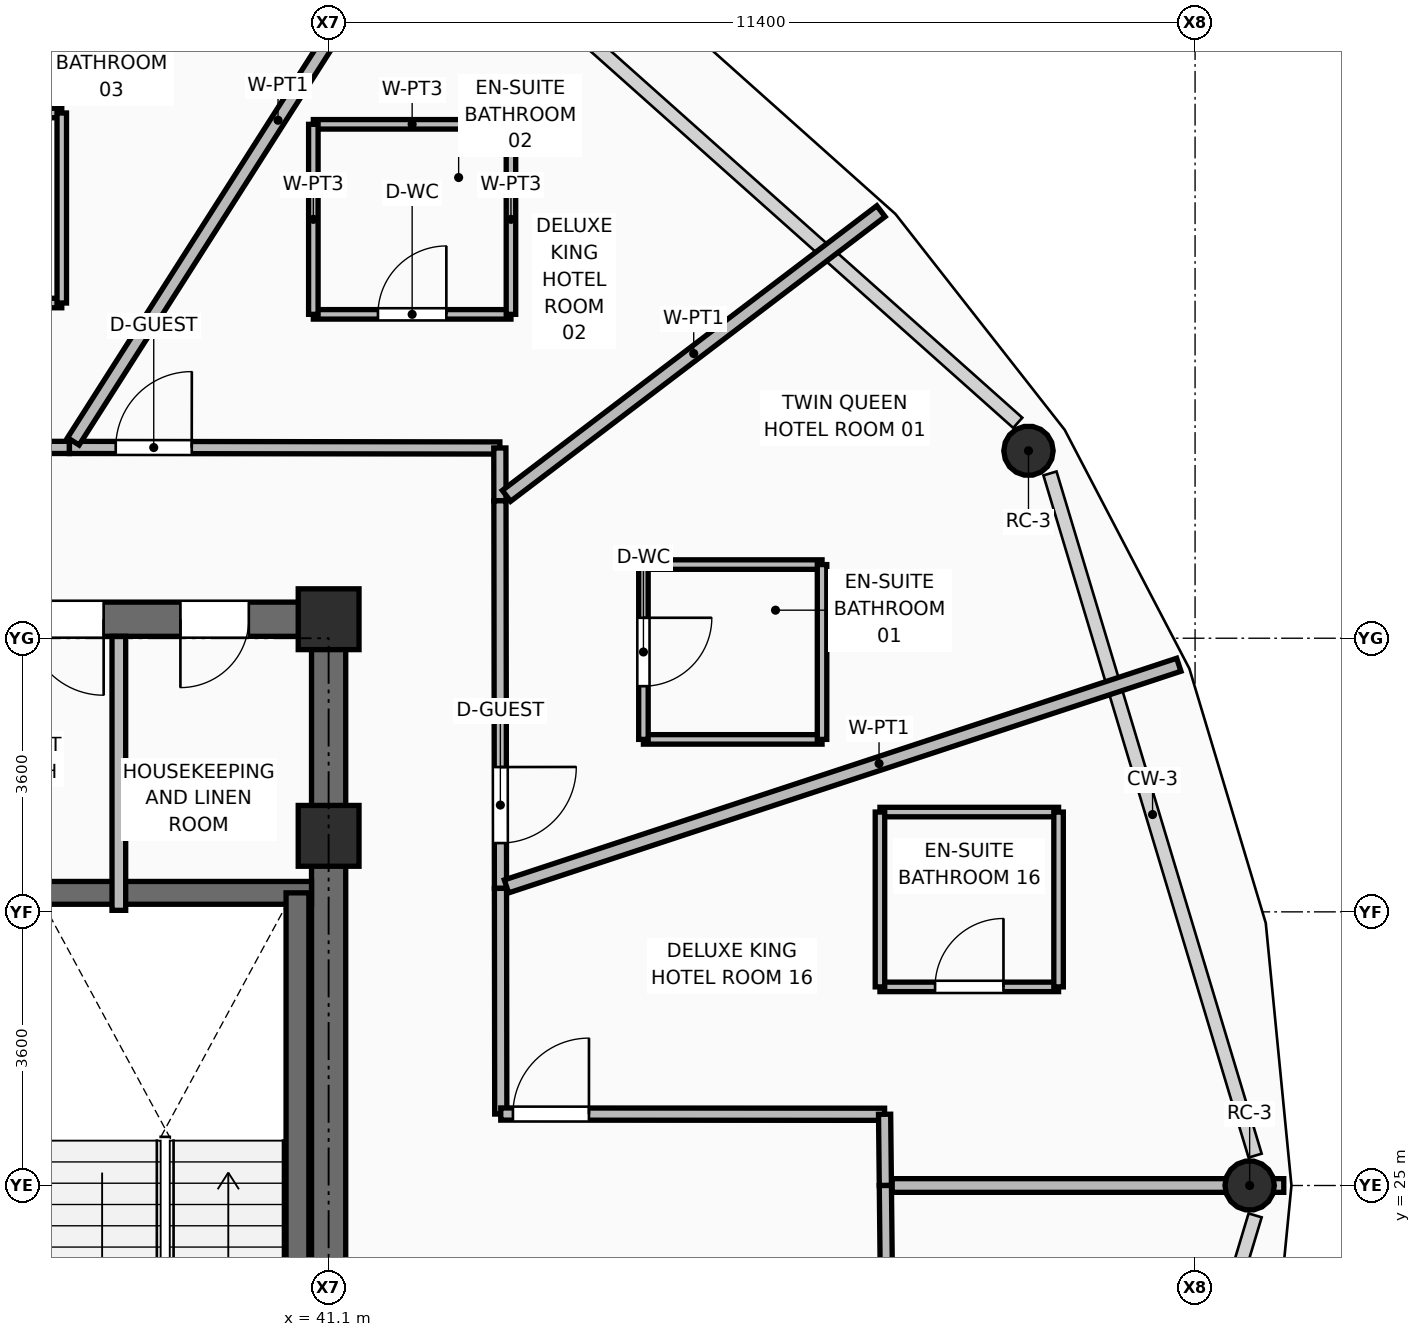
"""IFC4 building model, lengths in metres.
Left out: names, types, materials, properties, quantities, classifications, styles, units other than length and angle.
Written with IfcOpenShell. Run it as: python <this file> out.ifc"""

import sys

from ifc_helpers import new_model, si_unit, direction, frame, frame_2d, origin, origin_2d, place, context, subcontext, project, spatial, rectangle, hollow_circle, extrude, element, fill, save


model = new_model("IFC4")
c1 = context("Model", 3, precision=1e-05, world=origin(), true_north=direction((0.0, 1.0)))
c2 = subcontext(c1, "Body", "Model", "MODEL_VIEW")
j1 = project(units=[si_unit("LENGTHUNIT", "METRE"), si_unit("PLANEANGLEUNIT", "RADIAN")], contexts=[c1])
p1 = place(None, origin())
s1 = spatial("IfcSite", under=j1, at=p1, CompositionType="ELEMENT")
p2 = place(p1, origin())
s2 = spatial("IfcBuilding", under=s1, at=p2, CompositionType="ELEMENT")
p3 = place(p2, frame((0.0, 0.0, 249.9)))
s3 = spatial("IfcBuildingStorey", under=s2, at=p3, CompositionType="ELEMENT", Elevation=249.9)
for number, where, z_axis, x_axis in (
    (1, (41.1, 29.6, 0.0), (0.0, 0.0, 1.0), (1.0, 0.0, 0.0)),
    (2, (41.1, 32.45, 0.0), (0.0, 0.0, 1.0), (1.0, 0.0, 0.0)),
):
    element("IfcColumn", number, at=place(p3, frame(where, z_axis=z_axis, x_axis=x_axis)), inside=s3, PredefinedType="COLUMN", context=c2, shape_type="SweptSolid", body=[
        extrude(rectangle(XDim=0.8, YDim=0.8, at=origin_2d()), origin(), (0.0, 0.0, 1.0), 3.75),
    ])
p4 = place(p3, frame((53.218, 25.0, 0.0), z_axis=(-0.104543948341, 0.0, 0.9945202677), x_axis=(0.0, -1.0, 0.0)))
e3 = element("IfcColumn", 3, at=p4, inside=s3, PredefinedType="COLUMN", context=c2, shape_type="SweptSolid", body=[
    extrude(hollow_circle(Radius=0.325, WallThickness=0.03, at=origin_2d()), origin(), (0.0, 0.0, 1.0), 3.519),
])
p5 = place(p3, frame((50.308, 34.666, 0.0), z_axis=(-0.09041848627, -0.04663179031, 0.994811526608), x_axis=(0.458364904761, -0.888764093606, 0.0)))
e4 = element("IfcColumn", 4, at=p5, inside=s3, PredefinedType="COLUMN", context=c2, shape_type="SweptSolid", body=[
    extrude(hollow_circle(Radius=0.325, WallThickness=0.03, at=origin_2d()), origin(), (0.0, 0.0, 1.0), 3.518),
])
p6 = place(p3, frame((21.675, 32.45, 0.0), z_axis=(0.0, 0.0, 1.0), x_axis=(1.0, 0.0, 0.0)))
e5 = element("IfcWall", 5, at=p6, inside=s3, PredefinedType="SHEAR", context=c2, shape_type="SweptSolid", body=[
    extrude(rectangle(XDim=19.65, YDim=0.45, at=frame_2d((9.825, 0.0))), origin(), (0.0, 0.0, 1.0), 3.5),
])
p7 = place(p6, frame((2.075, 0.0, 0.0)))
e6 = element("IfcOpeningElement", 6, at=p7, cuts=e5, PredefinedType="OPENING", context=c2, shape_type="SweptSolid", body=[
    extrude(rectangle(XDim=1.1, YDim=2.1, at=frame_2d((0.55, 1.05))), frame((0.0, 0.235, 0.0), z_axis=(0.0, -1.0, 0.0), x_axis=(1.0, 0.0, 0.0)), (0.0, 0.0, 1.0), 0.47),
])
p8 = place(p6, frame((15.465, 0.0, 0.0)))
e7 = element("IfcOpeningElement", 7, at=p8, cuts=e5, PredefinedType="OPENING", context=c2, shape_type="SweptSolid", body=[
    extrude(rectangle(XDim=1.0, YDim=2.1, at=frame_2d((0.5, 1.05))), frame((0.0, 0.235, 0.0), z_axis=(0.0, -1.0, 0.0), x_axis=(1.0, 0.0, 0.0)), (0.0, 0.0, 1.0), 0.47),
])
p9 = place(p6, frame((17.475, 0.0, 0.0)))
e8 = element("IfcOpeningElement", 8, at=p9, cuts=e5, PredefinedType="OPENING", context=c2, shape_type="SweptSolid", body=[
    extrude(rectangle(XDim=0.9, YDim=2.1, at=frame_2d((0.45, 1.05))), frame((0.0, 0.235, 0.0), z_axis=(0.0, -1.0, 0.0), x_axis=(1.0, 0.0, 0.0)), (0.0, 0.0, 1.0), 0.47),
])
p10 = place(p3, frame((41.1, 18.025, 0.0), z_axis=(0.0, 0.0, 1.0), x_axis=(0.0, 1.0, 0.0)))
e9 = element("IfcWall", 9, at=p10, inside=s3, PredefinedType="SHEAR", context=c2, shape_type="SweptSolid", body=[
    extrude(rectangle(XDim=14.2, YDim=0.45, at=frame_2d((7.1, 0.0))), origin(), (0.0, 0.0, 1.0), 3.5),
])
p11 = place(p10, frame((3.435, 0.0, 0.0)))
e10 = element("IfcOpeningElement", 10, at=p11, cuts=e9, PredefinedType="OPENING", context=c2, shape_type="SweptSolid", body=[
    extrude(rectangle(XDim=1.05, YDim=2.1, at=frame_2d((0.525, 1.05))), frame((0.0, 0.235, 0.0), z_axis=(0.0, -1.0, 0.0), x_axis=(1.0, 0.0, 0.0)), (0.0, 0.0, 1.0), 0.47),
])
p12 = place(p3, frame((37.21, 28.85, 0.0), z_axis=(0.0, 0.0, 1.0), x_axis=(1.0, 0.0, 0.0)))
e11 = element("IfcWall", 11, at=p12, inside=s3, PredefinedType="SHEAR", context=c2, shape_type="SweptSolid", body=[
    extrude(rectangle(XDim=3.665, YDim=0.3, at=frame_2d((1.833, 0.0))), origin(), (0.0, 0.0, 1.0), 3.5),
])
p13 = place(p3, frame((40.69, 22.65, 0.0), z_axis=(0.0, 0.0, 1.0), x_axis=(0.0, 1.0, 0.0)))
e12 = element("IfcWall", 12, at=p13, inside=s3, PredefinedType="SHEAR", context=c2, shape_type="SweptSolid", body=[
    extrude(rectangle(XDim=6.2, YDim=0.3, at=frame_2d((3.1, 0.0))), origin(), (0.0, 0.0, 1.0), 3.5),
])
p14 = place(p3, frame((38.34, 28.62, 0.0), z_axis=(0.0, 0.0, 1.0), x_axis=(0.0, 1.0, 0.0)))
e13 = element("IfcWall", 13, at=p14, inside=s3, PredefinedType="PARTITIONING", context=c2, shape_type="SweptSolid", body=[
    extrude(rectangle(XDim=3.605, YDim=0.18, at=frame_2d((1.802, 0.0))), origin(), (0.0, 0.0, 1.0), 3.48),
])
p15 = place(p3, frame((33.392, 34.714, 0.0), z_axis=(0.0, 0.0, 1.0), x_axis=(0.999999533722, -0.000965689166, 0.0)))
e14 = element("IfcWall", 14, at=p15, inside=s3, PredefinedType="PARTITIONING", context=c2, shape_type="SweptSolid", body=[
    extrude(rectangle(XDim=4.298, YDim=0.16, at=frame_2d((2.149, 0.0))), origin(), (0.0, 0.0, 1.0), 3.48),
])
p16 = place(p15, frame((1.649, 0.0, 0.0)))
e15 = element("IfcOpeningElement", 15, at=p16, cuts=e14, PredefinedType="OPENING", context=c2, shape_type="SweptSolid", body=[
    extrude(rectangle(XDim=1.0, YDim=2.1, at=frame_2d((0.5, 1.05))), frame((0.0, 0.09, 0.0), z_axis=(0.0, -1.0, 0.0), x_axis=(1.0, 0.0, 0.0)), (0.0, 0.0, 1.0), 0.18),
])
p17 = place(p3, frame((37.69, 34.71, 0.0), z_axis=(0.0, 0.0, 1.0), x_axis=(0.999999218481, -0.001250214577, 0.0)))
e16 = element("IfcWall", 16, at=p17, inside=s3, PredefinedType="PARTITIONING", context=c2, shape_type="SweptSolid", body=[
    extrude(rectangle(XDim=5.663, YDim=0.16, at=frame_2d((2.832, 0.0))), origin(), (0.0, 0.0, 1.0), 3.012),
])
p18 = place(p17, frame((0.609, 0.0, 0.0)))
e17 = element("IfcOpeningElement", 17, at=p18, cuts=e16, PredefinedType="OPENING", context=c2, shape_type="SweptSolid", body=[
    extrude(rectangle(XDim=1.0, YDim=2.1, at=frame_2d((0.5, 1.05))), frame((0.0, 0.09, 0.0), z_axis=(0.0, -1.0, 0.0), x_axis=(1.0, 0.0, 0.0)), (0.0, 0.0, 1.0), 0.18),
])
p19 = place(p3, frame((43.353, 34.703, 0.0), z_axis=(0.0, 0.0, 1.0), x_axis=(0.001405479989, -0.999999012313, 0.0)))
e18 = element("IfcWall", 18, at=p19, inside=s3, PredefinedType="PARTITIONING", context=c2, shape_type="SweptSolid", body=[
    extrude(rectangle(XDim=0.695, YDim=0.16, at=frame_2d((0.347, 0.0))), origin(), (0.0, 0.0, 1.0), 3.48),
])
p20 = place(p3, frame((43.354, 34.008, 0.0), z_axis=(0.0, 0.0, 1.0), x_axis=(0.001388488559, -0.999999036049, 0.0)))
e19 = element("IfcWall", 19, at=p20, inside=s3, PredefinedType="PARTITIONING", context=c2, shape_type="SweptSolid", body=[
    extrude(rectangle(XDim=5.099, YDim=0.16, at=frame_2d((2.55, 0.0))), origin(), (0.0, 0.0, 1.0), 3.012),
])
p21 = place(p20, frame((3.503, 0.0, 0.0)))
e20 = element("IfcOpeningElement", 20, at=p21, cuts=e19, PredefinedType="OPENING", context=c2, shape_type="SweptSolid", body=[
    extrude(rectangle(XDim=1.0, YDim=2.1, at=frame_2d((0.5, 1.05))), frame((0.0, 0.09, 0.0), z_axis=(0.0, -1.0, 0.0), x_axis=(1.0, 0.0, 0.0)), (0.0, 0.0, 1.0), 0.18),
])
p22 = place(p3, frame((43.361, 28.909, 0.0), z_axis=(0.0, 0.0, 1.0), x_axis=(0.001315680137, -0.999999134493, 0.0)))
e21 = element("IfcWall", 21, at=p22, inside=s3, PredefinedType="PARTITIONING", context=c2, shape_type="SweptSolid", body=[
    extrude(rectangle(XDim=2.969, YDim=0.16, at=frame_2d((1.484, 0.0))), origin(), (0.0, 0.0, 1.0), 3.48),
])
p23 = place(p3, frame((43.365, 25.94, 0.0), z_axis=(0.0, 0.0, 1.0), x_axis=(0.999999831724, -0.000580130432, 0.0)))
e22 = element("IfcWall", 22, at=p23, inside=s3, PredefinedType="PARTITIONING", context=c2, shape_type="SweptSolid", body=[
    extrude(rectangle(XDim=5.05, YDim=0.16, at=frame_2d((2.525, 0.0))), origin(), (0.0, 0.0, 1.0), 3.48),
])
p24 = place(p23, frame((0.16, 0.0, 0.0)))
e23 = element("IfcOpeningElement", 23, at=p24, cuts=e22, PredefinedType="OPENING", context=c2, shape_type="SweptSolid", body=[
    extrude(rectangle(XDim=1.0, YDim=2.1, at=frame_2d((0.5, 1.05))), frame((0.0, 0.09, 0.0), z_axis=(0.0, -1.0, 0.0), x_axis=(1.0, 0.0, 0.0)), (0.0, 0.0, 1.0), 0.18),
])
p25 = place(p3, frame((48.415, 25.937, 0.0), z_axis=(0.0, 0.0, 1.0), x_axis=(0.010682037718, -0.999942945407, 0.0)))
e24 = element("IfcWall", 24, at=p25, inside=s3, PredefinedType="PARTITIONING", context=c2, shape_type="SweptSolid", body=[
    extrude(rectangle(XDim=0.937, YDim=0.16, at=frame_2d((0.469, 0.0))), origin(), (0.0, 0.0, 1.0), 3.48),
])
p26 = place(p3, frame((48.425, 25.0, 0.0), z_axis=(0.0, 0.0, 1.0), x_axis=(0.010606254369, -0.999943752102, 0.0)))
e25 = element("IfcWall", 25, at=p26, inside=s3, PredefinedType="PARTITIONING", context=c2, shape_type="SweptSolid", body=[
    extrude(rectangle(XDim=1.404, YDim=0.16, at=frame_2d((0.702, 0.0))), origin(), (0.0, 0.0, 1.0), 3.48),
])
p27 = place(p3, frame((43.44, 28.935, 0.0), z_axis=(0.0, 0.0, 1.0), x_axis=(0.949729147415, 0.313072749613, 0.0)))
e26 = element("IfcWall", 26, at=p27, inside=s3, PredefinedType="PARTITIONING", context=c2, shape_type="SweptSolid", body=[
    extrude(rectangle(XDim=9.314, YDim=0.18, at=frame_2d((4.657, 0.0))), origin(), (0.0, 0.0, 1.0), 2.855),
])
p28 = place(p3, frame((43.44, 34.073, 0.0), z_axis=(0.0, 0.0, 1.0), x_axis=(0.796115821465, 0.605144279336, 0.0)))
e27 = element("IfcWall", 27, at=p28, inside=s3, PredefinedType="PARTITIONING", context=c2, shape_type="SweptSolid", body=[
    extrude(rectangle(XDim=6.189, YDim=0.18, at=frame_2d((3.094, 0.0))), origin(), (0.0, 0.0, 1.0), 2.855),
])
p29 = place(p3, frame((37.741, 34.79, 0.0), z_axis=(0.0, 0.0, 1.0), x_axis=(0.537619190812, 0.843187764185, 0.0)))
e28 = element("IfcWall", 28, at=p29, inside=s3, PredefinedType="PARTITIONING", context=c2, shape_type="SweptSolid", body=[
    extrude(rectangle(XDim=8.77, YDim=0.18, at=frame_2d((4.385, 0.0))), origin(), (0.0, 0.0, 1.0), 2.855),
])
p30 = place(p3, frame((48.515, 25.0, 0.0), z_axis=(0.0, 0.0, 1.0), x_axis=(1.0, 0.0, 0.0)))
e29 = element("IfcWall", 29, at=p30, inside=s3, PredefinedType="PARTITIONING", context=c2, shape_type="SweptSolid", body=[
    extrude(rectangle(XDim=5.152, YDim=0.18, at=frame_2d((2.576, 0.0))), origin(), (0.0, 0.0, 1.0), 2.855),
])
p31 = place(p3, frame((45.242, 30.869, 0.0), z_axis=(0.0, 0.0, 1.0), x_axis=(1.0, 0.0, 0.0)))
e30 = element("IfcWall", 30, at=p31, inside=s3, PredefinedType="PARTITIONING", context=c2, shape_type="SweptSolid", body=[
    extrude(rectangle(XDim=2.35, YDim=0.125, at=frame_2d((1.175, 0.0))), origin(), (0.0, 0.0, 1.0), 3.48),
])
p32 = place(p3, frame((45.242, 33.169, 0.0), z_axis=(0.0, 0.0, 1.0), x_axis=(1.0, 0.0, 0.0)))
e31 = element("IfcWall", 31, at=p32, inside=s3, PredefinedType="PARTITIONING", context=c2, shape_type="SweptSolid", body=[
    extrude(rectangle(XDim=2.35, YDim=0.125, at=frame_2d((1.175, 0.0))), origin(), (0.0, 0.0, 1.0), 3.012),
])
p33 = place(p3, frame((45.242, 30.869, 0.0), z_axis=(0.0, 0.0, 1.0), x_axis=(0.0, 1.0, 0.0)))
e32 = element("IfcWall", 32, at=p33, inside=s3, PredefinedType="PARTITIONING", context=c2, shape_type="SweptSolid", body=[
    extrude(rectangle(XDim=2.3, YDim=0.125, at=frame_2d((1.15, 0.0))), origin(), (0.0, 0.0, 1.0), 3.012),
])
p34 = place(p33, frame((0.7, 0.0, 0.0)))
e33 = element("IfcOpeningElement", 33, at=p34, cuts=e32, PredefinedType="OPENING", context=c2, shape_type="SweptSolid", body=[
    extrude(rectangle(XDim=0.9, YDim=2.1, at=frame_2d((0.45, 1.05))), frame((0.0, 0.073, 0.0), z_axis=(0.0, -1.0, 0.0), x_axis=(1.0, 0.0, 0.0)), (0.0, 0.0, 1.0), 0.145),
])
p35 = place(p3, frame((47.592, 30.869, 0.0), z_axis=(0.0, 0.0, 1.0), x_axis=(0.0, 1.0, 0.0)))
e34 = element("IfcWall", 34, at=p35, inside=s3, PredefinedType="PARTITIONING", context=c2, shape_type="SweptSolid", body=[
    extrude(rectangle(XDim=2.3, YDim=0.125, at=frame_2d((1.15, 0.0))), origin(), (0.0, 0.0, 1.0), 3.48),
])
p36 = place(p3, frame((40.899, 36.461, 0.0), z_axis=(0.0, 0.0, 1.0), x_axis=(1.0, 0.0, 0.0)))
e35 = element("IfcWall", 35, at=p36, inside=s3, PredefinedType="PARTITIONING", context=c2, shape_type="SweptSolid", body=[
    extrude(rectangle(XDim=2.6, YDim=0.125, at=frame_2d((1.3, 0.0))), origin(), (0.0, 0.0, 1.0), 3.012),
])
p37 = place(p36, frame((0.85, 0.0, 0.0)))
e36 = element("IfcOpeningElement", 36, at=p37, cuts=e35, PredefinedType="OPENING", context=c2, shape_type="SweptSolid", body=[
    extrude(rectangle(XDim=0.9, YDim=2.1, at=frame_2d((0.45, 1.05))), frame((0.0, 0.073, 0.0), z_axis=(0.0, -1.0, 0.0), x_axis=(1.0, 0.0, 0.0)), (0.0, 0.0, 1.0), 0.145),
])
p38 = place(p3, frame((40.899, 38.961, 0.0), z_axis=(0.0, 0.0, 1.0), x_axis=(1.0, 0.0, 0.0)))
e37 = element("IfcWall", 37, at=p38, inside=s3, PredefinedType="PARTITIONING", context=c2, shape_type="SweptSolid", body=[
    extrude(rectangle(XDim=2.6, YDim=0.125, at=frame_2d((1.3, 0.0))), origin(), (0.0, 0.0, 1.0), 3.012),
])
for number, where, z_axis, x_axis in (
    (38, (40.899, 36.461, 0.0), (0.0, 0.0, 1.0), (0.0, 1.0, 0.0)),
    (39, (43.499, 36.461, 0.0), (0.0, 0.0, 1.0), (0.0, 1.0, 0.0)),
):
    element("IfcWall", number, at=place(p3, frame(where, z_axis=z_axis, x_axis=x_axis)), inside=s3, PredefinedType="PARTITIONING", context=c2, shape_type="SweptSolid", body=[
        extrude(rectangle(XDim=2.5, YDim=0.125, at=frame_2d((1.25, 0.0))), origin(), (0.0, 0.0, 1.0), 3.48),
    ])
p39 = place(p3, frame((34.989, 36.61, 0.0), z_axis=(0.0, 0.0, 1.0), x_axis=(1.0, 0.0, 0.0)))
e40 = element("IfcWall", 40, at=p39, inside=s3, PredefinedType="PARTITIONING", context=c2, shape_type="SweptSolid", body=[
    extrude(rectangle(XDim=2.6, YDim=0.125, at=frame_2d((1.3, 0.0))), origin(), (0.0, 0.0, 1.0), 3.48),
])
p40 = place(p39, frame((0.85, 0.0, 0.0)))
e41 = element("IfcOpeningElement", 41, at=p40, cuts=e40, PredefinedType="OPENING", context=c2, shape_type="SweptSolid", body=[
    extrude(rectangle(XDim=0.9, YDim=2.1, at=frame_2d((0.45, 1.05))), frame((0.0, 0.073, 0.0), z_axis=(0.0, -1.0, 0.0), x_axis=(1.0, 0.0, 0.0)), (0.0, 0.0, 1.0), 0.145),
])
p41 = place(p3, frame((34.989, 39.11, 0.0), z_axis=(0.0, 0.0, 1.0), x_axis=(1.0, 0.0, 0.0)))
e42 = element("IfcWall", 42, at=p41, inside=s3, PredefinedType="PARTITIONING", context=c2, shape_type="SweptSolid", body=[
    extrude(rectangle(XDim=2.6, YDim=0.125, at=frame_2d((1.3, 0.0))), origin(), (0.0, 0.0, 1.0), 3.48),
])
p42 = place(p3, frame((37.589, 36.61, 0.0), z_axis=(0.0, 0.0, 1.0), x_axis=(0.0, 1.0, 0.0)))
e43 = element("IfcWall", 43, at=p42, inside=s3, PredefinedType="PARTITIONING", context=c2, shape_type="SweptSolid", body=[
    extrude(rectangle(XDim=2.5, YDim=0.125, at=frame_2d((1.25, 0.0))), origin(), (0.0, 0.0, 1.0), 3.48),
])
p43 = place(p3, frame((48.354, 27.613, 0.0), z_axis=(0.0, 0.0, 1.0), x_axis=(1.0, 0.0, 0.0)))
e44 = element("IfcWall", 44, at=p43, inside=s3, PredefinedType="PARTITIONING", context=c2, shape_type="SweptSolid", body=[
    extrude(rectangle(XDim=2.35, YDim=0.125, at=frame_2d((1.175, 0.0))), origin(), (0.0, 0.0, 1.0), 3.48),
])
p44 = place(p43, frame((0.725, 0.0, 0.0)))
e45 = element("IfcOpeningElement", 45, at=p44, cuts=e44, PredefinedType="OPENING", context=c2, shape_type="SweptSolid", body=[
    extrude(rectangle(XDim=0.9, YDim=2.1, at=frame_2d((0.45, 1.05))), frame((0.0, 0.073, 0.0), z_axis=(0.0, -1.0, 0.0), x_axis=(1.0, 0.0, 0.0)), (0.0, 0.0, 1.0), 0.145),
])
p45 = place(p3, frame((48.354, 29.913, 0.0), z_axis=(0.0, 0.0, 1.0), x_axis=(1.0, 0.0, 0.0)))
e46 = element("IfcWall", 46, at=p45, inside=s3, PredefinedType="PARTITIONING", context=c2, shape_type="SweptSolid", body=[
    extrude(rectangle(XDim=2.35, YDim=0.125, at=frame_2d((1.175, 0.0))), origin(), (0.0, 0.0, 1.0), 3.48),
])
for number, where, z_axis, x_axis in (
    (47, (48.354, 27.613, 0.0), (0.0, 0.0, 1.0), (0.0, 1.0, 0.0)),
    (48, (50.704, 27.613, 0.0), (0.0, 0.0, 1.0), (0.0, 1.0, 0.0)),
):
    element("IfcWall", number, at=place(p3, frame(where, z_axis=z_axis, x_axis=x_axis)), inside=s3, PredefinedType="PARTITIONING", context=c2, shape_type="SweptSolid", body=[
        extrude(rectangle(XDim=2.3, YDim=0.125, at=frame_2d((1.15, 0.0))), origin(), (0.0, 0.0, 1.0), 3.48),
    ])
p46 = place(p8, frame((1.0, 0.0, 0.0), z_axis=(0.0, 0.0, 1.0), x_axis=(-1.0, 0.0, 0.0)))
e49 = element("IfcDoor", 49, at=p46, inside=s3, OperationType="SINGLE_SWING_LEFT", PredefinedType="DOOR", context=c2, shape_type="SweptSolid", body=[
    extrude(rectangle(XDim=1.0, YDim=2.1, at=frame_2d((0.5, 1.05))), frame((0.0, 0.025, 0.0), z_axis=(0.0, -1.0, 0.0), x_axis=(1.0, 0.0, 0.0)), (0.0, 0.0, 1.0), 0.05),
])
fill(e7, e49)
p47 = place(p9, frame((0.9, 0.0, 0.0), z_axis=(0.0, 0.0, 1.0), x_axis=(-1.0, 0.0, 0.0)))
e50 = element("IfcDoor", 50, at=p47, inside=s3, OperationType="SINGLE_SWING_RIGHT", PredefinedType="DOOR", context=c2, shape_type="SweptSolid", body=[
    extrude(rectangle(XDim=0.9, YDim=2.1, at=frame_2d((0.45, 1.05))), frame((0.0, 0.025, 0.0), z_axis=(0.0, -1.0, 0.0), x_axis=(1.0, 0.0, 0.0)), (0.0, 0.0, 1.0), 0.05),
])
fill(e8, e50)
p48 = place(p34, frame((0.9, 0.0, 0.0), z_axis=(0.0, 0.0, 1.0), x_axis=(-1.0, 0.0, 0.0)))
e51 = element("IfcDoor", 51, at=p48, inside=s3, OperationType="SINGLE_SWING_LEFT", PredefinedType="DOOR", context=c2, shape_type="SweptSolid", body=[
    extrude(rectangle(XDim=0.9, YDim=2.1, at=frame_2d((0.45, 1.05))), frame((0.0, 0.025, 0.0), z_axis=(0.0, -1.0, 0.0), x_axis=(1.0, 0.0, 0.0)), (0.0, 0.0, 1.0), 0.05),
])
fill(e33, e51)
p49 = place(p21, origin())
e52 = element("IfcDoor", 52, at=p49, inside=s3, OperationType="SINGLE_SWING_LEFT", PredefinedType="DOOR", context=c2, shape_type="SweptSolid", body=[
    extrude(rectangle(XDim=1.0, YDim=2.1, at=frame_2d((0.5, 1.05))), frame((0.0, 0.025, 0.0), z_axis=(0.0, -1.0, 0.0), x_axis=(1.0, 0.0, 0.0)), (0.0, 0.0, 1.0), 0.05),
])
fill(e20, e52)
p50 = place(p37, origin())
e53 = element("IfcDoor", 53, at=p50, inside=s3, OperationType="SINGLE_SWING_RIGHT", PredefinedType="DOOR", context=c2, shape_type="SweptSolid", body=[
    extrude(rectangle(XDim=0.9, YDim=2.1, at=frame_2d((0.45, 1.05))), frame((0.0, 0.025, 0.0), z_axis=(0.0, -1.0, 0.0), x_axis=(1.0, 0.0, 0.0)), (0.0, 0.0, 1.0), 0.05),
])
fill(e36, e53)
p51 = place(p18, origin())
e54 = element("IfcDoor", 54, at=p51, inside=s3, OperationType="SINGLE_SWING_RIGHT", PredefinedType="DOOR", context=c2, shape_type="SweptSolid", body=[
    extrude(rectangle(XDim=1.0, YDim=2.1, at=frame_2d((0.5, 1.05))), frame((0.0, 0.025, 0.0), z_axis=(0.0, -1.0, 0.0), x_axis=(1.0, 0.0, 0.0)), (0.0, 0.0, 1.0), 0.05),
])
fill(e17, e54)
p52 = place(p44, origin())
e55 = element("IfcDoor", 55, at=p52, inside=s3, OperationType="SINGLE_SWING_RIGHT", PredefinedType="DOOR", context=c2, shape_type="SweptSolid", body=[
    extrude(rectangle(XDim=0.9, YDim=2.1, at=frame_2d((0.45, 1.05))), frame((0.0, 0.025, 0.0), z_axis=(0.0, -1.0, 0.0), x_axis=(1.0, 0.0, 0.0)), (0.0, 0.0, 1.0), 0.05),
])
fill(e45, e55)
p53 = place(p24, origin())
e56 = element("IfcDoor", 56, at=p53, inside=s3, OperationType="SINGLE_SWING_RIGHT", PredefinedType="DOOR", context=c2, shape_type="SweptSolid", body=[
    extrude(rectangle(XDim=1.0, YDim=2.1, at=frame_2d((0.5, 1.05))), frame((0.0, 0.025, 0.0), z_axis=(0.0, -1.0, 0.0), x_axis=(1.0, 0.0, 0.0)), (0.0, 0.0, 1.0), 0.05),
])
fill(e23, e56)
save(model, sys.argv[1])
